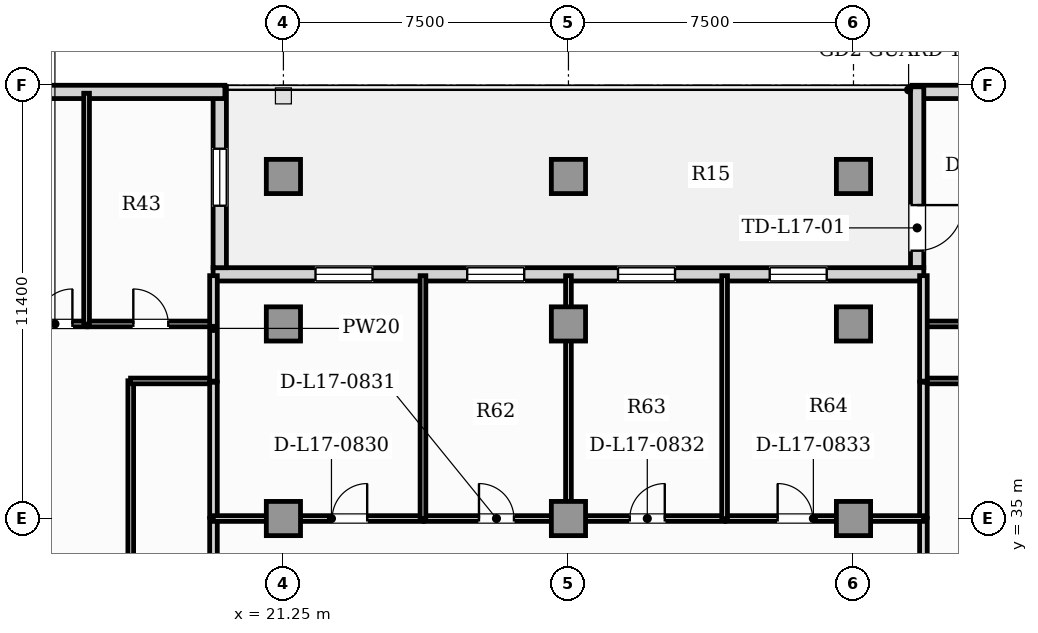
"""IFC4 building model, lengths in metres.
Left out: names, types, materials, properties, quantities, classifications, styles, units other than length and angle.
Written with IfcOpenShell. Run it as: python <this file> out.ifc"""

import sys

from ifc_helpers import new_model, si_unit, direction, frame, frame_2d, origin, origin_2d, place, context, subcontext, project, spatial, rectangle, extrude, element, fill, save


model = new_model("IFC4")
c1 = context("Model", 3, precision=1e-05, world=origin(), true_north=direction((0.0, 1.0)))
c2 = subcontext(c1, "Body", "Model", "MODEL_VIEW")
j1 = project(units=[si_unit("LENGTHUNIT", "METRE"), si_unit("PLANEANGLEUNIT", "RADIAN")], contexts=[c1])
p1 = place(None, origin())
s1 = spatial("IfcSite", under=j1, at=p1, CompositionType="ELEMENT")
p2 = place(p1, origin())
s2 = spatial("IfcBuilding", under=s1, at=p2, CompositionType="ELEMENT")
p3 = place(p2, frame((0.0, 0.0, 72.15)))
s3 = spatial("IfcBuildingStorey", under=s2, at=p3, CompositionType="ELEMENT", Elevation=72.15)
for number, where, z_axis, x_axis in (
    (1, (21.25, 44.0, 0.0), (0.0, 0.0, 1.0), (1.0, 0.0, 0.0)),
    (2, (28.75, 44.0, 0.0), (0.0, 0.0, 1.0), (1.0, 0.0, 0.0)),
    (3, (36.25, 44.0, 0.0), (0.0, 0.0, 1.0), (1.0, 0.0, 0.0)),
    (4, (21.25, 40.12, 0.0), (0.0, 0.0, 1.0), (1.0, 0.0, 0.0)),
    (5, (28.75, 40.12, 0.0), (0.0, 0.0, 1.0), (1.0, 0.0, 0.0)),
    (6, (36.25, 40.12, 0.0), (0.0, 0.0, 1.0), (1.0, 0.0, 0.0)),
    (7, (21.25, 35.0, 0.0), (0.0, 0.0, 1.0), (1.0, 0.0, 0.0)),
    (8, (28.75, 35.0, 0.0), (0.0, 0.0, 1.0), (1.0, 0.0, 0.0)),
    (9, (36.25, 35.0, 0.0), (0.0, 0.0, 1.0), (1.0, 0.0, 0.0)),
):
    element("IfcColumn", number, at=place(p3, frame(where, z_axis=z_axis, x_axis=x_axis)), inside=s3, PredefinedType="COLUMN", context=c2, shape_type="SweptSolid", body=[
        extrude(rectangle(XDim=0.9, YDim=0.9, at=origin_2d()), origin(), (0.0, 0.0, 1.0), 3.85),
    ])
p4 = place(p3, frame((54.26, 46.225, 0.0), z_axis=(0.0, 0.0, 1.0), x_axis=(-1.0, 0.0, 0.0)))
e10 = element("IfcWall", 10, at=p4, inside=s3, PredefinedType="SOLIDWALL", context=c2, shape_type="SweptSolid", body=[
    extrude(rectangle(XDim=16.47, YDim=0.35, at=frame_2d((8.235, 0.0))), origin(), (0.0, 0.0, 1.0), 3.57),
])
p5 = place(p4, frame((3.25, 0.0, 0.9)))
e11 = element("IfcOpeningElement", 11, at=p5, cuts=e10, PredefinedType="OPENING", context=c2, shape_type="SweptSolid", body=[
    extrude(rectangle(XDim=1.5, YDim=1.95, at=frame_2d((0.75, 0.975))), frame((0.0, 0.185, 0.0), z_axis=(0.0, -1.0, 0.0), x_axis=(1.0, 0.0, 0.0)), (0.0, 0.0, 1.0), 0.37),
])
p6 = place(p4, frame((12.812, 0.0, 0.9)))
e12 = element("IfcOpeningElement", 12, at=p6, cuts=e10, PredefinedType="OPENING", context=c2, shape_type="SweptSolid", body=[
    extrude(rectangle(XDim=1.5, YDim=1.95, at=frame_2d((0.75, 0.975))), frame((0.0, 0.185, 0.0), z_axis=(0.0, -1.0, 0.0), x_axis=(1.0, 0.0, 0.0)), (0.0, 0.0, 1.0), 0.37),
])
p7 = place(p4, frame((9.569, 0.0, 0.9)))
e13 = element("IfcOpeningElement", 13, at=p7, cuts=e10, PredefinedType="OPENING", context=c2, shape_type="SweptSolid", body=[
    extrude(rectangle(XDim=1.5, YDim=1.95, at=frame_2d((0.75, 0.975))), frame((0.0, 0.185, 0.0), z_axis=(0.0, -1.0, 0.0), x_axis=(1.0, 0.0, 0.0)), (0.0, 0.0, 1.0), 0.37),
])
p8 = place(p3, frame((37.925, 46.36, 0.0), z_axis=(0.0, 0.0, 1.0), x_axis=(0.0, -1.0, 0.0)))
e14 = element("IfcWall", 14, at=p8, inside=s3, PredefinedType="SOLIDWALL", context=c2, shape_type="SweptSolid", body=[
    extrude(rectangle(XDim=4.76, YDim=0.35, at=frame_2d((2.38, 0.0))), origin(), (0.0, 0.0, 1.0), 3.57),
])
p9 = place(p8, frame((3.113, 0.0, 0.0)))
e15 = element("IfcOpeningElement", 15, at=p9, cuts=e14, PredefinedType="OPENING", context=c2, shape_type="SweptSolid", body=[
    extrude(rectangle(XDim=1.2, YDim=2.2, at=frame_2d((0.6, 1.1))), frame((0.0, 0.185, 0.0), z_axis=(0.0, -1.0, 0.0), x_axis=(1.0, 0.0, 0.0)), (0.0, 0.0, 1.0), 0.37),
])
p10 = place(p3, frame((38.1, 41.425, 0.0), z_axis=(0.0, 0.0, 1.0), x_axis=(-1.0, 0.0, 0.0)))
e16 = element("IfcWall", 16, at=p10, inside=s3, PredefinedType="SOLIDWALL", context=c2, shape_type="SweptSolid", body=[
    extrude(rectangle(XDim=18.7, YDim=0.35, at=frame_2d((9.35, 0.0))), origin(), (0.0, 0.0, 1.0), 3.57),
])
p11 = place(p10, frame((14.506, 0.0, 0.9)))
e17 = element("IfcOpeningElement", 17, at=p11, cuts=e16, PredefinedType="OPENING", context=c2, shape_type="SweptSolid", body=[
    extrude(rectangle(XDim=1.5, YDim=1.95, at=frame_2d((0.75, 0.975))), frame((0.0, 0.185, 0.0), z_axis=(0.0, -1.0, 0.0), x_axis=(1.0, 0.0, 0.0)), (0.0, 0.0, 1.0), 0.37),
])
p12 = place(p10, frame((10.514, 0.0, 0.9)))
e18 = element("IfcOpeningElement", 18, at=p12, cuts=e16, PredefinedType="OPENING", context=c2, shape_type="SweptSolid", body=[
    extrude(rectangle(XDim=1.5, YDim=1.95, at=frame_2d((0.75, 0.975))), frame((0.0, 0.185, 0.0), z_axis=(0.0, -1.0, 0.0), x_axis=(1.0, 0.0, 0.0)), (0.0, 0.0, 1.0), 0.37),
])
p13 = place(p10, frame((6.546, 0.0, 0.9)))
e19 = element("IfcOpeningElement", 19, at=p13, cuts=e16, PredefinedType="OPENING", context=c2, shape_type="SweptSolid", body=[
    extrude(rectangle(XDim=1.5, YDim=1.95, at=frame_2d((0.75, 0.975))), frame((0.0, 0.185, 0.0), z_axis=(0.0, -1.0, 0.0), x_axis=(1.0, 0.0, 0.0)), (0.0, 0.0, 1.0), 0.37),
])
p14 = place(p10, frame((2.554, 0.0, 0.9)))
e20 = element("IfcOpeningElement", 20, at=p14, cuts=e16, PredefinedType="OPENING", context=c2, shape_type="SweptSolid", body=[
    extrude(rectangle(XDim=1.5, YDim=1.95, at=frame_2d((0.75, 0.975))), frame((0.0, 0.185, 0.0), z_axis=(0.0, -1.0, 0.0), x_axis=(1.0, 0.0, 0.0)), (0.0, 0.0, 1.0), 0.37),
])
p15 = place(p3, frame((19.575, 41.6, 0.0), z_axis=(0.0, 0.0, 1.0), x_axis=(0.0, 1.0, 0.0)))
e21 = element("IfcWall", 21, at=p15, inside=s3, PredefinedType="SOLIDWALL", context=c2, shape_type="SweptSolid", body=[
    extrude(rectangle(XDim=4.76, YDim=0.35, at=frame_2d((2.38, 0.0))), origin(), (0.0, 0.0, 1.0), 3.57),
])
p16 = place(p15, frame((1.63, 0.0, 0.9)))
e22 = element("IfcOpeningElement", 22, at=p16, cuts=e21, PredefinedType="OPENING", context=c2, shape_type="SweptSolid", body=[
    extrude(rectangle(XDim=1.5, YDim=1.95, at=frame_2d((0.75, 0.975))), frame((0.0, 0.185, 0.0), z_axis=(0.0, -1.0, 0.0), x_axis=(1.0, 0.0, 0.0)), (0.0, 0.0, 1.0), 0.37),
])
p17 = place(p3, frame((19.71, 46.225, 0.0), z_axis=(0.0, 0.0, 1.0), x_axis=(-1.0, 0.0, 0.0)))
e23 = element("IfcWall", 23, at=p17, inside=s3, PredefinedType="SOLIDWALL", context=c2, shape_type="SweptSolid", body=[
    extrude(rectangle(XDim=16.47, YDim=0.35, at=frame_2d((8.235, 0.0))), origin(), (0.0, 0.0, 1.0), 3.57),
])
p18 = place(p17, frame((14.2, 0.0, 0.9)))
e24 = element("IfcOpeningElement", 24, at=p18, cuts=e23, PredefinedType="OPENING", context=c2, shape_type="SweptSolid", body=[
    extrude(rectangle(XDim=1.5, YDim=1.95, at=frame_2d((0.75, 0.975))), frame((0.0, 0.185, 0.0), z_axis=(0.0, -1.0, 0.0), x_axis=(1.0, 0.0, 0.0)), (0.0, 0.0, 1.0), 0.37),
])
p19 = place(p17, frame((11.219, 0.0, 0.9)))
e25 = element("IfcOpeningElement", 25, at=p19, cuts=e23, PredefinedType="OPENING", context=c2, shape_type="SweptSolid", body=[
    extrude(rectangle(XDim=1.5, YDim=1.95, at=frame_2d((0.75, 0.975))), frame((0.0, 0.185, 0.0), z_axis=(0.0, -1.0, 0.0), x_axis=(1.0, 0.0, 0.0)), (0.0, 0.0, 1.0), 0.37),
])
p20 = place(p17, frame((4.979, 0.0, 0.9)))
e26 = element("IfcOpeningElement", 26, at=p20, cuts=e23, PredefinedType="OPENING", context=c2, shape_type="SweptSolid", body=[
    extrude(rectangle(XDim=1.5, YDim=1.95, at=frame_2d((0.75, 0.975))), frame((0.0, 0.185, 0.0), z_axis=(0.0, -1.0, 0.0), x_axis=(1.0, 0.0, 0.0)), (0.0, 0.0, 1.0), 0.37),
])
p21 = place(p3, frame((17.233, 19.504, 0.0), z_axis=(0.0, 0.0, 1.0), x_axis=(0.0, 1.0, 0.0)))
e27 = element("IfcWall", 27, at=p21, inside=s3, PredefinedType="PARTITIONING", context=c2, shape_type="SweptSolid", body=[
    extrude(rectangle(XDim=19.121, YDim=0.15, at=frame_2d((9.561, 0.0))), origin(), (0.0, 0.0, 1.0), 3.57),
])
p22 = place(p21, frame((9.101, 0.0, 0.0)))
e28 = element("IfcOpeningElement", 28, at=p22, cuts=e27, PredefinedType="OPENING", context=c2, shape_type="SweptSolid", body=[
    extrude(rectangle(XDim=0.92, YDim=2.1, at=frame_2d((0.46, 1.05))), frame((0.0, 0.085, 0.0), z_axis=(0.0, -1.0, 0.0), x_axis=(1.0, 0.0, 0.0)), (0.0, 0.0, 1.0), 0.17),
])
p23 = place(p3, frame((17.228, 38.62, 0.0), z_axis=(0.0, 0.0, 1.0), x_axis=(1.0, 0.0, 0.0)))
e29 = element("IfcWall", 29, at=p23, inside=s3, PredefinedType="PARTITIONING", context=c2, shape_type="SweptSolid", body=[
    extrude(rectangle(XDim=2.187, YDim=0.15, at=frame_2d((1.094, 0.0))), origin(), (0.0, 0.0, 1.0), 3.57),
])
p24 = place(p3, frame((11.885, 40.12, 0.0), z_axis=(0.0, 0.0, 1.0), x_axis=(1.0, 0.0, 0.0)))
e30 = element("IfcWall", 30, at=p24, inside=s3, PredefinedType="PARTITIONING", context=c2, shape_type="SweptSolid", body=[
    extrude(rectangle(XDim=4.191, YDim=0.15, at=frame_2d((2.096, 0.0))), origin(), (0.0, 0.0, 1.0), 3.57),
])
p25 = place(p24, frame((2.893, 0.0, 0.0)))
e31 = element("IfcOpeningElement", 31, at=p25, cuts=e30, PredefinedType="OPENING", context=c2, shape_type="SweptSolid", body=[
    extrude(rectangle(XDim=0.92, YDim=2.1, at=frame_2d((0.46, 1.05))), frame((0.0, 0.085, 0.0), z_axis=(0.0, -1.0, 0.0), x_axis=(1.0, 0.0, 0.0)), (0.0, 0.0, 1.0), 0.17),
])
p26 = place(p3, frame((16.106, 40.12, 0.0), z_axis=(0.0, 0.0, 1.0), x_axis=(1.0, 0.0, 0.0)))
e32 = element("IfcWall", 32, at=p26, inside=s3, PredefinedType="PARTITIONING", context=c2, shape_type="SweptSolid", body=[
    extrude(rectangle(XDim=3.309, YDim=0.15, at=frame_2d((1.654, 0.0))), origin(), (0.0, 0.0, 1.0), 3.57),
])
p27 = place(p26, frame((1.194, 0.0, 0.0)))
e33 = element("IfcOpeningElement", 33, at=p27, cuts=e32, PredefinedType="OPENING", context=c2, shape_type="SweptSolid", body=[
    extrude(rectangle(XDim=0.92, YDim=2.1, at=frame_2d((0.46, 1.05))), frame((0.0, 0.085, 0.0), z_axis=(0.0, -1.0, 0.0), x_axis=(1.0, 0.0, 0.0)), (0.0, 0.0, 1.0), 0.17),
])
p28 = place(p3, frame((19.41, 38.615, 0.0), z_axis=(0.0, 0.0, 1.0), x_axis=(0.0, 1.0, 0.0)))
e34 = element("IfcWall", 34, at=p28, inside=s3, PredefinedType="PARTITIONING", context=c2, shape_type="SweptSolid", body=[
    extrude(rectangle(XDim=2.775, YDim=0.2, at=frame_2d((1.387, 0.0))), origin(), (0.0, 0.0, 1.0), 3.57),
])
p29 = place(p3, frame((19.41, 33.495, 0.0), z_axis=(0.0, 0.0, 1.0), x_axis=(0.0, 1.0, 0.0)))
e35 = element("IfcWall", 35, at=p29, inside=s3, PredefinedType="PARTITIONING", context=c2, shape_type="SweptSolid", body=[
    extrude(rectangle(XDim=1.51, YDim=0.2, at=frame_2d((0.755, 0.0))), origin(), (0.0, 0.0, 1.0), 3.57),
])
p30 = place(p3, frame((19.41, 35.035, 0.0), z_axis=(0.0, 0.0, 1.0), x_axis=(0.0, 1.0, 0.0)))
e36 = element("IfcWall", 36, at=p30, inside=s3, PredefinedType="PARTITIONING", context=c2, shape_type="SweptSolid", body=[
    extrude(rectangle(XDim=3.55, YDim=0.2, at=frame_2d((1.775, 0.0))), origin(), (0.0, 0.0, 1.0), 3.57),
])
p31 = place(p3, frame((16.071, 40.115, 0.0), z_axis=(0.0, 0.0, 1.0), x_axis=(0.0, 1.0, 0.0)))
e37 = element("IfcWall", 37, at=p31, inside=s3, PredefinedType="PARTITIONING", context=c2, shape_type="SweptSolid", body=[
    extrude(rectangle(XDim=6.075, YDim=0.15, at=frame_2d((3.038, 0.0))), origin(), (0.0, 0.0, 1.0), 3.57),
])
p32 = place(p3, frame((38.085, 38.62, 0.0), z_axis=(0.0, 0.0, 1.0), x_axis=(1.0, 0.0, 0.0)))
e38 = element("IfcWall", 38, at=p32, inside=s3, PredefinedType="PARTITIONING", context=c2, shape_type="SweptSolid", body=[
    extrude(rectangle(XDim=2.202, YDim=0.15, at=frame_2d((1.101, 0.0))), origin(), (0.0, 0.0, 1.0), 3.57),
])
p33 = place(p3, frame((38.085, 40.12, 0.0), z_axis=(0.0, 0.0, 1.0), x_axis=(1.0, 0.0, 0.0)))
e39 = element("IfcWall", 39, at=p33, inside=s3, PredefinedType="PARTITIONING", context=c2, shape_type="SweptSolid", body=[
    extrude(rectangle(XDim=4.191, YDim=0.15, at=frame_2d((2.096, 0.0))), origin(), (0.0, 0.0, 1.0), 3.57),
])
p34 = place(p33, frame((1.635, 0.0, 0.0)))
e40 = element("IfcOpeningElement", 40, at=p34, cuts=e39, PredefinedType="OPENING", context=c2, shape_type="SweptSolid", body=[
    extrude(rectangle(XDim=0.92, YDim=2.1, at=frame_2d((0.46, 1.05))), frame((0.0, 0.085, 0.0), z_axis=(0.0, -1.0, 0.0), x_axis=(1.0, 0.0, 0.0)), (0.0, 0.0, 1.0), 0.17),
])
p35 = place(p3, frame((38.09, 38.615, 0.0), z_axis=(0.0, 0.0, 1.0), x_axis=(0.0, 1.0, 0.0)))
e41 = element("IfcWall", 41, at=p35, inside=s3, PredefinedType="PARTITIONING", context=c2, shape_type="SweptSolid", body=[
    extrude(rectangle(XDim=2.775, YDim=0.2, at=frame_2d((1.387, 0.0))), origin(), (0.0, 0.0, 1.0), 3.57),
])
p36 = place(p3, frame((38.09, 33.495, 0.0), z_axis=(0.0, 0.0, 1.0), x_axis=(0.0, 1.0, 0.0)))
e42 = element("IfcWall", 42, at=p36, inside=s3, PredefinedType="PARTITIONING", context=c2, shape_type="SweptSolid", body=[
    extrude(rectangle(XDim=1.51, YDim=0.2, at=frame_2d((0.755, 0.0))), origin(), (0.0, 0.0, 1.0), 3.57),
])
p37 = place(p3, frame((38.09, 35.035, 0.0), z_axis=(0.0, 0.0, 1.0), x_axis=(0.0, 1.0, 0.0)))
e43 = element("IfcWall", 43, at=p37, inside=s3, PredefinedType="PARTITIONING", context=c2, shape_type="SweptSolid", body=[
    extrude(rectangle(XDim=3.55, YDim=0.2, at=frame_2d((1.775, 0.0))), origin(), (0.0, 0.0, 1.0), 3.57),
])
p38 = place(p3, frame((19.405, 35.0, 0.0), z_axis=(0.0, 0.0, 1.0), x_axis=(1.0, 0.0, 0.0)))
e44 = element("IfcWall", 44, at=p38, inside=s3, PredefinedType="PARTITIONING", context=c2, shape_type="SweptSolid", body=[
    extrude(rectangle(XDim=5.522, YDim=0.15, at=frame_2d((2.761, 0.0))), origin(), (0.0, 0.0, 1.0), 2.934),
])
p39 = place(p38, frame((3.129, 0.0, 0.0)))
e45 = element("IfcOpeningElement", 45, at=p39, cuts=e44, PredefinedType="OPENING", context=c2, shape_type="SweptSolid", body=[
    extrude(rectangle(XDim=0.92, YDim=2.1, at=frame_2d((0.46, 1.05))), frame((0.0, 0.085, 0.0), z_axis=(0.0, -1.0, 0.0), x_axis=(1.0, 0.0, 0.0)), (0.0, 0.0, 1.0), 0.17),
])
p40 = place(p3, frame((24.957, 35.0, 0.0), z_axis=(0.0, 0.0, 1.0), x_axis=(1.0, 0.0, 0.0)))
e46 = element("IfcWall", 46, at=p40, inside=s3, PredefinedType="PARTITIONING", context=c2, shape_type="SweptSolid", body=[
    extrude(rectangle(XDim=3.798, YDim=0.15, at=frame_2d((1.899, 0.0))), origin(), (0.0, 0.0, 1.0), 2.934),
])
p41 = place(p40, frame((1.439, 0.0, 0.0)))
e47 = element("IfcOpeningElement", 47, at=p41, cuts=e46, PredefinedType="OPENING", context=c2, shape_type="SweptSolid", body=[
    extrude(rectangle(XDim=0.92, YDim=2.1, at=frame_2d((0.46, 1.05))), frame((0.0, 0.085, 0.0), z_axis=(0.0, -1.0, 0.0), x_axis=(1.0, 0.0, 0.0)), (0.0, 0.0, 1.0), 0.17),
])
p42 = place(p3, frame((28.785, 35.0, 0.0), z_axis=(0.0, 0.0, 1.0), x_axis=(1.0, 0.0, 0.0)))
e48 = element("IfcWall", 48, at=p42, inside=s3, PredefinedType="PARTITIONING", context=c2, shape_type="SweptSolid", body=[
    extrude(rectangle(XDim=4.079, YDim=0.15, at=frame_2d((2.04, 0.0))), origin(), (0.0, 0.0, 1.0), 2.934),
])
p43 = place(p42, frame((1.579, 0.0, 0.0)))
e49 = element("IfcOpeningElement", 49, at=p43, cuts=e48, PredefinedType="OPENING", context=c2, shape_type="SweptSolid", body=[
    extrude(rectangle(XDim=0.92, YDim=2.1, at=frame_2d((0.46, 1.05))), frame((0.0, 0.085, 0.0), z_axis=(0.0, -1.0, 0.0), x_axis=(1.0, 0.0, 0.0)), (0.0, 0.0, 1.0), 0.17),
])
p44 = place(p3, frame((32.894, 35.0, 0.0), z_axis=(0.0, 0.0, 1.0), x_axis=(1.0, 0.0, 0.0)))
e50 = element("IfcWall", 50, at=p44, inside=s3, PredefinedType="PARTITIONING", context=c2, shape_type="SweptSolid", body=[
    extrude(rectangle(XDim=5.201, YDim=0.15, at=frame_2d((2.601, 0.0))), origin(), (0.0, 0.0, 1.0), 2.934),
])
p45 = place(p44, frame((1.361, 0.0, 0.0)))
e51 = element("IfcOpeningElement", 51, at=p45, cuts=e50, PredefinedType="OPENING", context=c2, shape_type="SweptSolid", body=[
    extrude(rectangle(XDim=0.92, YDim=2.1, at=frame_2d((0.46, 1.05))), frame((0.0, 0.085, 0.0), z_axis=(0.0, -1.0, 0.0), x_axis=(1.0, 0.0, 0.0)), (0.0, 0.0, 1.0), 0.17),
])
p46 = place(p3, frame((24.922, 34.995, 0.0), z_axis=(0.0, 0.0, 1.0), x_axis=(0.0, 1.0, 0.0)))
e52 = element("IfcWall", 52, at=p46, inside=s3, PredefinedType="PARTITIONING", context=c2, shape_type="SweptSolid", body=[
    extrude(rectangle(XDim=6.395, YDim=0.15, at=frame_2d((3.197, 0.0))), origin(), (0.0, 0.0, 1.0), 3.57),
])
p47 = place(p3, frame((28.75, 34.995, 0.0), z_axis=(0.0, 0.0, 1.0), x_axis=(0.0, 1.0, 0.0)))
e53 = element("IfcWall", 53, at=p47, inside=s3, PredefinedType="PARTITIONING", context=c2, shape_type="SweptSolid", body=[
    extrude(rectangle(XDim=6.395, YDim=0.15, at=frame_2d((3.197, 0.0))), origin(), (0.0, 0.0, 1.0), 3.11),
])
p48 = place(p3, frame((32.859, 34.995, 0.0), z_axis=(0.0, 0.0, 1.0), x_axis=(0.0, 1.0, 0.0)))
e54 = element("IfcWall", 54, at=p48, inside=s3, PredefinedType="PARTITIONING", context=c2, shape_type="SweptSolid", body=[
    extrude(rectangle(XDim=6.395, YDim=0.15, at=frame_2d((3.197, 0.0))), origin(), (0.0, 0.0, 1.0), 3.57),
])
p49 = place(p9, frame((1.2, 0.0, 0.0), z_axis=(0.0, 0.0, 1.0), x_axis=(-1.0, 0.0, 0.0)))
e55 = element("IfcDoor", 55, at=p49, inside=s3, OperationType="SINGLE_SWING_RIGHT", PredefinedType="DOOR", context=c2, shape_type="SweptSolid", body=[
    extrude(rectangle(XDim=1.2, YDim=2.2, at=frame_2d((0.6, 1.1))), frame((0.0, 0.025, 0.0), z_axis=(0.0, -1.0, 0.0), x_axis=(1.0, 0.0, 0.0)), (0.0, 0.0, 1.0), 0.05),
])
fill(e15, e55)
p50 = place(p16, origin())
e56 = element("IfcWindow", 56, at=p50, inside=s3, PartitioningType="SINGLE_PANEL", PredefinedType="WINDOW", context=c2, shape_type="SweptSolid", body=[
    extrude(rectangle(XDim=1.5, YDim=1.95, at=frame_2d((0.75, 0.975))), frame((0.0, 0.03, 0.0), z_axis=(0.0, -1.0, 0.0), x_axis=(1.0, 0.0, 0.0)), (0.0, 0.0, 1.0), 0.06),
])
fill(e22, e56)
p51 = place(p11, origin())
e57 = element("IfcWindow", 57, at=p51, inside=s3, PartitioningType="SINGLE_PANEL", PredefinedType="WINDOW", context=c2, shape_type="SweptSolid", body=[
    extrude(rectangle(XDim=1.5, YDim=1.95, at=frame_2d((0.75, 0.975))), frame((0.0, 0.03, 0.0), z_axis=(0.0, -1.0, 0.0), x_axis=(1.0, 0.0, 0.0)), (0.0, 0.0, 1.0), 0.06),
])
fill(e17, e57)
p52 = place(p12, origin())
e58 = element("IfcWindow", 58, at=p52, inside=s3, PartitioningType="SINGLE_PANEL", PredefinedType="WINDOW", context=c2, shape_type="SweptSolid", body=[
    extrude(rectangle(XDim=1.5, YDim=1.95, at=frame_2d((0.75, 0.975))), frame((0.0, 0.03, 0.0), z_axis=(0.0, -1.0, 0.0), x_axis=(1.0, 0.0, 0.0)), (0.0, 0.0, 1.0), 0.06),
])
fill(e18, e58)
p53 = place(p13, origin())
e59 = element("IfcWindow", 59, at=p53, inside=s3, PartitioningType="SINGLE_PANEL", PredefinedType="WINDOW", context=c2, shape_type="SweptSolid", body=[
    extrude(rectangle(XDim=1.5, YDim=1.95, at=frame_2d((0.75, 0.975))), frame((0.0, 0.03, 0.0), z_axis=(0.0, -1.0, 0.0), x_axis=(1.0, 0.0, 0.0)), (0.0, 0.0, 1.0), 0.06),
])
fill(e19, e59)
p54 = place(p14, origin())
e60 = element("IfcWindow", 60, at=p54, inside=s3, PartitioningType="SINGLE_PANEL", PredefinedType="WINDOW", context=c2, shape_type="SweptSolid", body=[
    extrude(rectangle(XDim=1.5, YDim=1.95, at=frame_2d((0.75, 0.975))), frame((0.0, 0.03, 0.0), z_axis=(0.0, -1.0, 0.0), x_axis=(1.0, 0.0, 0.0)), (0.0, 0.0, 1.0), 0.06),
])
fill(e20, e60)
p55 = place(p25, origin())
e61 = element("IfcDoor", 61, at=p55, inside=s3, OperationType="SINGLE_SWING_RIGHT", PredefinedType="DOOR", context=c2, shape_type="SweptSolid", body=[
    extrude(rectangle(XDim=0.92, YDim=2.1, at=frame_2d((0.46, 1.05))), frame((0.0, 0.025, 0.0), z_axis=(0.0, -1.0, 0.0), x_axis=(1.0, 0.0, 0.0)), (0.0, 0.0, 1.0), 0.05),
])
fill(e31, e61)
p56 = place(p27, origin())
e62 = element("IfcDoor", 62, at=p56, inside=s3, OperationType="SINGLE_SWING_LEFT", PredefinedType="DOOR", context=c2, shape_type="SweptSolid", body=[
    extrude(rectangle(XDim=0.92, YDim=2.1, at=frame_2d((0.46, 1.05))), frame((0.0, 0.025, 0.0), z_axis=(0.0, -1.0, 0.0), x_axis=(1.0, 0.0, 0.0)), (0.0, 0.0, 1.0), 0.05),
])
fill(e33, e62)
p57 = place(p39, origin())
e63 = element("IfcDoor", 63, at=p57, inside=s3, OperationType="SINGLE_SWING_RIGHT", PredefinedType="DOOR", context=c2, shape_type="SweptSolid", body=[
    extrude(rectangle(XDim=0.92, YDim=2.1, at=frame_2d((0.46, 1.05))), frame((0.0, 0.025, 0.0), z_axis=(0.0, -1.0, 0.0), x_axis=(1.0, 0.0, 0.0)), (0.0, 0.0, 1.0), 0.05),
])
fill(e45, e63)
p58 = place(p41, origin())
e64 = element("IfcDoor", 64, at=p58, inside=s3, OperationType="SINGLE_SWING_LEFT", PredefinedType="DOOR", context=c2, shape_type="SweptSolid", body=[
    extrude(rectangle(XDim=0.92, YDim=2.1, at=frame_2d((0.46, 1.05))), frame((0.0, 0.025, 0.0), z_axis=(0.0, -1.0, 0.0), x_axis=(1.0, 0.0, 0.0)), (0.0, 0.0, 1.0), 0.05),
])
fill(e47, e64)
p59 = place(p43, origin())
e65 = element("IfcDoor", 65, at=p59, inside=s3, OperationType="SINGLE_SWING_RIGHT", PredefinedType="DOOR", context=c2, shape_type="SweptSolid", body=[
    extrude(rectangle(XDim=0.92, YDim=2.1, at=frame_2d((0.46, 1.05))), frame((0.0, 0.025, 0.0), z_axis=(0.0, -1.0, 0.0), x_axis=(1.0, 0.0, 0.0)), (0.0, 0.0, 1.0), 0.05),
])
fill(e49, e65)
p60 = place(p45, origin())
e66 = element("IfcDoor", 66, at=p60, inside=s3, OperationType="SINGLE_SWING_LEFT", PredefinedType="DOOR", context=c2, shape_type="SweptSolid", body=[
    extrude(rectangle(XDim=0.92, YDim=2.1, at=frame_2d((0.46, 1.05))), frame((0.0, 0.025, 0.0), z_axis=(0.0, -1.0, 0.0), x_axis=(1.0, 0.0, 0.0)), (0.0, 0.0, 1.0), 0.05),
])
fill(e51, e66)
save(model, sys.argv[1])
